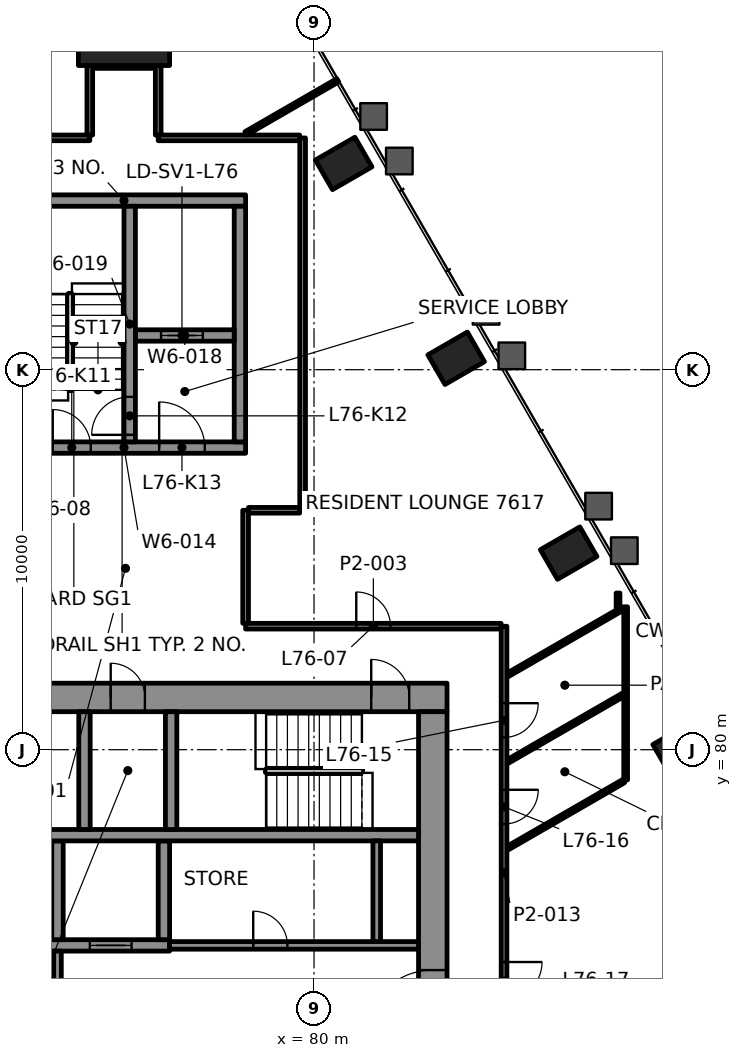
"""IFC4 building model, lengths in metres.
Left out: names, types, materials, properties, quantities, classifications, styles, units other than length and angle.
Written with IfcOpenShell. Run it as: python <this file> out.ifc"""

import sys

from ifc_helpers import new_model, si_unit, direction, frame, frame_2d, origin, origin_2d, place, context, subcontext, project, spatial, rectangle, hollow_rectangle, extrude, element, fill, save


model = new_model("IFC4")
c1 = context("Model", 3, precision=1e-05, world=origin(), true_north=direction((0.0, 1.0)))
c2 = subcontext(c1, "Body", "Model", "MODEL_VIEW")
j1 = project(units=[si_unit("LENGTHUNIT", "METRE"), si_unit("PLANEANGLEUNIT", "RADIAN")], contexts=[c1])
p1 = place(None, origin())
s1 = spatial("IfcSite", under=j1, at=p1, CompositionType="ELEMENT")
p2 = place(p1, origin())
s2 = spatial("IfcBuilding", under=s1, at=p2, CompositionType="ELEMENT")
p3 = place(p2, frame((0.0, 0.0, 312.6)))
s3 = spatial("IfcBuildingStorey", under=s2, at=p3, CompositionType="ELEMENT", Elevation=312.6)
p4 = place(p3, frame((75.0, 99.204, 0.0), z_axis=(0.0, 0.0, 1.0), x_axis=(-1.0, 0.0, 0.0)))
e1 = element("IfcColumn", 1, at=p4, inside=s3, PredefinedType="COLUMN", context=c2, shape_type="SweptSolid", body=[
    extrude(rectangle(XDim=2.4, YDim=2.4, at=origin_2d()), origin(), (0.0, 0.0, 1.0), 3.5),
])
for number, where, z_axis, x_axis in (
    (2, (89.661, 80.046, -0.0), (0.0, 0.0, 1.0), (-0.5, 0.866, 0.0)),
    (3, (86.701, 85.173, -0.0), (0.0, 0.0, 1.0), (-0.5, 0.866, 0.0)),
    (4, (83.74, 90.3, -0.0), (0.0, 0.0, 1.0), (-0.5, 0.866, 0.0)),
    (5, (80.781, 95.427, -0.0), (0.0, 0.0, 1.0), (-0.5, 0.866, 0.0)),
):
    element("IfcColumn", number, at=place(p3, frame(where, z_axis=z_axis, x_axis=x_axis)), inside=s3, PredefinedType="COLUMN", context=c2, shape_type="SweptSolid", body=[
        extrude(hollow_rectangle(XDim=0.9, YDim=1.2, WallThickness=0.06, at=origin_2d()), origin(), (0.0, 0.0, 1.0), 3.5),
    ])
p5 = place(p3, frame((66.5, 81.375, 0.0), z_axis=(0.0, 0.0, 1.0), x_axis=(1.0, 0.0, 0.0)))
e6 = element("IfcWall", 6, at=p5, inside=s3, PredefinedType="SHEAR", context=c2, shape_type="SweptSolid", body=[
    extrude(rectangle(XDim=17.0, YDim=0.75, at=frame_2d((8.5, 0.0))), origin(), (0.0, 0.0, 1.0), 3.3),
])
p6 = place(p5, frame((1.195, 0.0, 0.0)))
e7 = element("IfcOpeningElement", 7, at=p6, cuts=e6, PredefinedType="OPENING", context=c2, shape_type="SweptSolid", body=[
    extrude(rectangle(XDim=1.0, YDim=2.1, at=frame_2d((0.5, 1.05))), frame((0.0, 0.385, 0.0), z_axis=(0.0, -1.0, 0.0), x_axis=(1.0, 0.0, 0.0)), (0.0, 0.0, 1.0), 0.77),
])
p7 = place(p5, frame((15.005, 0.0, 0.0)))
e8 = element("IfcOpeningElement", 8, at=p7, cuts=e6, PredefinedType="OPENING", context=c2, shape_type="SweptSolid", body=[
    extrude(rectangle(XDim=1.0, YDim=2.1, at=frame_2d((0.5, 1.05))), frame((0.0, 0.385, 0.0), z_axis=(0.0, -1.0, 0.0), x_axis=(1.0, 0.0, 0.0)), (0.0, 0.0, 1.0), 0.77),
])
p8 = place(p5, frame((8.15, 0.0, 0.0)))
e9 = element("IfcOpeningElement", 9, at=p8, cuts=e6, PredefinedType="OPENING", context=c2, shape_type="SweptSolid", body=[
    extrude(rectangle(XDim=0.9, YDim=2.1, at=frame_2d((0.45, 1.05))), frame((0.0, 0.385, 0.0), z_axis=(0.0, -1.0, 0.0), x_axis=(1.0, 0.0, 0.0)), (0.0, 0.0, 1.0), 0.77),
])
p9 = place(p3, frame((83.125, 69.0, 0.0), z_axis=(0.0, 0.0, 1.0), x_axis=(0.0, 1.0, 0.0)))
e10 = element("IfcWall", 10, at=p9, inside=s3, PredefinedType="SHEAR", context=c2, shape_type="SweptSolid", body=[
    extrude(rectangle(XDim=12.0, YDim=0.75, at=frame_2d((6.0, 0.0))), origin(), (0.0, 0.0, 1.0), 3.3),
])
p10 = place(p9, frame((3.4, 0.0, 0.0)))
e11 = element("IfcOpeningElement", 11, at=p10, cuts=e10, PredefinedType="OPENING", context=c2, shape_type="SweptSolid", body=[
    extrude(rectangle(XDim=1.8, YDim=2.1, at=frame_2d((0.9, 1.05))), frame((0.0, 0.385, 0.0), z_axis=(0.0, -1.0, 0.0), x_axis=(1.0, 0.0, 0.0)), (0.0, 0.0, 1.0), 0.77),
])
p11 = place(p3, frame((70.3, 74.85, 0.0), z_axis=(0.0, 0.0, 1.0), x_axis=(1.0, 0.0, 0.0)))
e12 = element("IfcWall", 12, at=p11, inside=s3, PredefinedType="SHEAR", context=c2, shape_type="SweptSolid", body=[
    extrude(rectangle(XDim=5.9, YDim=0.3, at=frame_2d((2.95, 0.0))), origin(), (0.0, 0.0, 1.0), 3.3),
])
p12 = place(p11, frame((3.8, 0.0, 0.0)))
e13 = element("IfcOpeningElement", 13, at=p12, cuts=e12, PredefinedType="OPENING", context=c2, shape_type="SweptSolid", body=[
    extrude(rectangle(XDim=1.1, YDim=2.1, at=frame_2d((0.55, 1.05))), frame((0.0, 0.16, 0.0), z_axis=(0.0, -1.0, 0.0), x_axis=(1.0, 0.0, 0.0)), (0.0, 0.0, 1.0), 0.32),
])
for number, where, z_axis, x_axis in (
    (14, (73.25, 75.0, 0.0), (0.0, 0.0, 1.0), (0.0, 1.0, 0.0)),
    (15, (76.05, 75.0, 0.0), (0.0, 0.0, 1.0), (0.0, 1.0, 0.0)),
):
    element("IfcWall", number, at=place(p3, frame(where, z_axis=z_axis, x_axis=x_axis)), inside=s3, PredefinedType="SHEAR", context=c2, shape_type="SweptSolid", body=[
        extrude(rectangle(XDim=2.6, YDim=0.3, at=frame_2d((1.3, 0.0))), origin(), (0.0, 0.0, 1.0), 3.3),
    ])
p13 = place(p3, frame((67.25, 77.75, 0.0), z_axis=(0.0, 0.0, 1.0), x_axis=(1.0, 0.0, 0.0)))
e16 = element("IfcWall", 16, at=p13, inside=s3, PredefinedType="SHEAR", context=c2, shape_type="SweptSolid", body=[
    extrude(rectangle(XDim=15.5, YDim=0.3, at=frame_2d((7.75, 0.0))), origin(), (0.0, 0.0, 1.0), 3.3),
])
p14 = place(p13, frame((0.445, 0.0, 0.0)))
e17 = element("IfcOpeningElement", 17, at=p14, cuts=e16, PredefinedType="OPENING", context=c2, shape_type="SweptSolid", body=[
    extrude(rectangle(XDim=1.0, YDim=2.1, at=frame_2d((0.5, 1.05))), frame((0.0, 0.16, 0.0), z_axis=(0.0, -1.0, 0.0), x_axis=(1.0, 0.0, 0.0)), (0.0, 0.0, 1.0), 0.32),
])
for number, where, z_axis, x_axis in (
    (18, (73.96, 77.9, 0.0), (0.0, 0.0, 1.0), (0.0, 1.0, 0.0)),
    (19, (76.24, 77.9, 0.0), (0.0, 0.0, 1.0), (0.0, 1.0, 0.0)),
):
    element("IfcWall", number, at=place(p3, frame(where, z_axis=z_axis, x_axis=x_axis)), inside=s3, PredefinedType="SHEAR", context=c2, shape_type="SweptSolid", body=[
        extrude(rectangle(XDim=3.1, YDim=0.3, at=frame_2d((1.55, 0.0))), origin(), (0.0, 0.0, 1.0), 3.3),
    ])
p15 = place(p3, frame((71.8, 87.95, 0.0), z_axis=(0.0, 0.0, 1.0), x_axis=(1.0, 0.0, 0.0)))
e20 = element("IfcWall", 20, at=p15, inside=s3, PredefinedType="SHEAR", context=c2, shape_type="SweptSolid", body=[
    extrude(rectangle(XDim=6.4, YDim=0.3, at=frame_2d((3.2, 0.0))), origin(), (0.0, 0.0, 1.0), 3.3),
])
p16 = place(p15, frame((1.325, 0.0, 0.0)))
e21 = element("IfcOpeningElement", 21, at=p16, cuts=e20, PredefinedType="OPENING", context=c2, shape_type="SweptSolid", body=[
    extrude(rectangle(XDim=1.0, YDim=2.1, at=frame_2d((0.5, 1.05))), frame((0.0, 0.16, 0.0), z_axis=(0.0, -1.0, 0.0), x_axis=(1.0, 0.0, 0.0)), (0.0, 0.0, 1.0), 0.32),
])
p17 = place(p15, frame((4.125, 0.0, 0.0)))
e22 = element("IfcOpeningElement", 22, at=p17, cuts=e20, PredefinedType="OPENING", context=c2, shape_type="SweptSolid", body=[
    extrude(rectangle(XDim=1.2, YDim=2.1, at=frame_2d((0.6, 1.05))), frame((0.0, 0.16, 0.0), z_axis=(0.0, -1.0, 0.0), x_axis=(1.0, 0.0, 0.0)), (0.0, 0.0, 1.0), 0.32),
])
p18 = place(p3, frame((71.8, 94.45, 0.0), z_axis=(0.0, 0.0, 1.0), x_axis=(1.0, 0.0, 0.0)))
e23 = element("IfcWall", 23, at=p18, inside=s3, PredefinedType="SHEAR", context=c2, shape_type="SweptSolid", body=[
    extrude(rectangle(XDim=6.4, YDim=0.3, at=frame_2d((3.2, 0.0))), origin(), (0.0, 0.0, 1.0), 3.3),
])
p19 = place(p3, frame((78.05, 88.1, 0.0), z_axis=(0.0, 0.0, 1.0), x_axis=(0.0, 1.0, 0.0)))
e24 = element("IfcWall", 24, at=p19, inside=s3, PredefinedType="SHEAR", context=c2, shape_type="SweptSolid", body=[
    extrude(rectangle(XDim=6.2, YDim=0.3, at=frame_2d((3.1, 0.0))), origin(), (0.0, 0.0, 1.0), 3.3),
])
p20 = place(p3, frame((75.3, 90.9, 0.0), z_axis=(0.0, 0.0, 1.0), x_axis=(1.0, 0.0, 0.0)))
e25 = element("IfcWall", 25, at=p20, inside=s3, PredefinedType="SHEAR", context=c2, shape_type="SweptSolid", body=[
    extrude(rectangle(XDim=2.6, YDim=0.3, at=frame_2d((1.3, 0.0))), origin(), (0.0, 0.0, 1.0), 3.3),
])
p21 = place(p20, frame((0.675, 0.0, 0.0)))
e26 = element("IfcOpeningElement", 26, at=p21, cuts=e25, PredefinedType="OPENING", context=c2, shape_type="SweptSolid", body=[
    extrude(rectangle(XDim=1.1, YDim=2.1, at=frame_2d((0.55, 1.05))), frame((0.0, 0.16, 0.0), z_axis=(0.0, -1.0, 0.0), x_axis=(1.0, 0.0, 0.0)), (0.0, 0.0, 1.0), 0.32),
])
p22 = place(p3, frame((75.15, 88.1, 0.0), z_axis=(0.0, 0.0, 1.0), x_axis=(0.0, 1.0, 0.0)))
e27 = element("IfcWall", 27, at=p22, inside=s3, PredefinedType="SHEAR", context=c2, shape_type="SweptSolid", body=[
    extrude(rectangle(XDim=6.2, YDim=0.3, at=frame_2d((3.1, 0.0))), origin(), (0.0, 0.0, 1.0), 3.3),
])
p23 = place(p22, frame((0.185, 0.0, 0.0)))
e28 = element("IfcOpeningElement", 28, at=p23, cuts=e27, PredefinedType="OPENING", context=c2, shape_type="SweptSolid", body=[
    extrude(rectangle(XDim=1.0, YDim=2.1, at=frame_2d((0.5, 1.05))), frame((0.0, 0.16, 0.0), z_axis=(0.0, -1.0, 0.0), x_axis=(1.0, 0.0, 0.0)), (0.0, 0.0, 1.0), 0.32),
])
p24 = place(p3, frame((78.2, 83.25, 0.0), z_axis=(0.0, 0.0, 1.0), x_axis=(1.0, 0.0, 0.0)))
e29 = element("IfcWall", 29, at=p24, inside=s3, PredefinedType="PARTITIONING", context=c2, shape_type="SweptSolid", body=[
    extrude(rectangle(XDim=6.723, YDim=0.15, at=frame_2d((3.362, 0.0))), origin(), (0.0, 0.0, 1.0), 2.7),
])
p25 = place(p24, frame((2.911, 0.0, 0.0)))
e30 = element("IfcOpeningElement", 30, at=p25, cuts=e29, PredefinedType="OPENING", context=c2, shape_type="SweptSolid", body=[
    extrude(rectangle(XDim=0.9, YDim=2.1, at=frame_2d((0.45, 1.05))), frame((0.0, 0.085, 0.0), z_axis=(0.0, -1.0, 0.0), x_axis=(1.0, 0.0, 0.0)), (0.0, 0.0, 1.0), 0.17),
])
p26 = place(p3, frame((78.275, 86.3, 0.0), z_axis=(0.0, 0.0, 1.0), x_axis=(1.0, 0.0, 0.0)))
e31 = element("IfcWall", 31, at=p26, inside=s3, PredefinedType="PARTITIONING", context=c2, shape_type="SweptSolid", body=[
    extrude(rectangle(XDim=1.348, YDim=0.15, at=frame_2d((0.674, 0.0))), origin(), (0.0, 0.0, 1.0), 2.7),
])
p27 = place(p3, frame((70.375, 96.1, 0.0), z_axis=(0.0, 0.0, 1.0), x_axis=(1.0, 0.0, 0.0)))
e32 = element("IfcWall", 32, at=p27, inside=s3, PredefinedType="PARTITIONING", context=c2, shape_type="SweptSolid", body=[
    extrude(rectangle(XDim=3.725, YDim=0.15, at=frame_2d((1.862, 0.0))), origin(), (0.0, 0.0, 1.0), 2.7),
])
p28 = place(p3, frame((75.9, 96.1, 0.0), z_axis=(0.0, 0.0, 1.0), x_axis=(1.0, 0.0, 0.0)))
e33 = element("IfcWall", 33, at=p28, inside=s3, PredefinedType="PARTITIONING", context=c2, shape_type="SweptSolid", body=[
    extrude(rectangle(XDim=3.723, YDim=0.15, at=frame_2d((1.862, 0.0))), origin(), (0.0, 0.0, 1.0), 2.7),
])
p29 = place(p3, frame((74.176, 98.004, 0.0), z_axis=(0.0, 0.0, 1.0), x_axis=(1.0, 0.0, 0.0)))
e34 = element("IfcWall", 34, at=p29, inside=s3, PredefinedType="PARTITIONING", context=c2, shape_type="SweptSolid", body=[
    extrude(rectangle(XDim=1.649, YDim=0.15, at=frame_2d((0.824, 0.0))), origin(), (0.0, 0.0, 1.0), 2.697),
])
p30 = place(p3, frame((85.101, 77.414, 0.0), z_axis=(0.0, 0.0, 1.0), x_axis=(0.866041242935, 0.499972564782, 0.0)))
e35 = element("IfcWall", 35, at=p30, inside=s3, PredefinedType="PARTITIONING", context=c2, shape_type="SweptSolid", body=[
    extrude(rectangle(XDim=3.521, YDim=0.1, at=frame_2d((1.76, 0.0))), origin(), (0.0, 0.0, 1.0), 2.7),
])
p31 = place(p3, frame((85.101, 79.692, 0.0), z_axis=(0.0, 0.0, 1.0), x_axis=(0.866017863565, 0.500013059815, 0.0)))
e36 = element("IfcWall", 36, at=p31, inside=s3, PredefinedType="PARTITIONING", context=c2, shape_type="SweptSolid", body=[
    extrude(rectangle(XDim=3.491, YDim=0.1, at=frame_2d((1.745, 0.0))), origin(), (0.0, 0.0, 1.0), 2.7),
])
p32 = place(p3, frame((85.101, 81.971, 0.0), z_axis=(0.0, 0.0, 1.0), x_axis=(0.866017863565, 0.500013059815, 0.0)))
e37 = element("IfcWall", 37, at=p32, inside=s3, PredefinedType="PARTITIONING", context=c2, shape_type="SweptSolid", body=[
    extrude(rectangle(XDim=3.491, YDim=0.1, at=frame_2d((1.745, 0.0))), origin(), (0.0, 0.0, 1.0), 2.688),
])
p33 = place(p3, frame((78.208, 96.22, 0.0), z_axis=(0.0, 0.0, 1.0), x_axis=(0.866028321769, 0.499994945868, 0.0)))
e38 = element("IfcWall", 38, at=p33, inside=s3, PredefinedType="PARTITIONING", context=c2, shape_type="SweptSolid", body=[
    extrude(rectangle(XDim=2.792, YDim=0.1, at=frame_2d((1.396, 0.0))), origin(), (0.0, 0.0, 1.0), 2.7),
])
p34 = place(p3, frame((88.2, 79.203, 0.0), z_axis=(0.0, 0.0, 1.0), x_axis=(0.0, 1.0, 0.0)))
e39 = element("IfcWall", 39, at=p34, inside=s3, PredefinedType="PARTITIONING", context=c2, shape_type="SweptSolid", body=[
    extrude(rectangle(XDim=4.557, YDim=0.1, at=frame_2d((2.279, 0.0))), origin(), (0.0, 0.0, 1.0), 2.688),
])
p35 = place(p3, frame((88.0, 83.733, 0.0), z_axis=(0.0, 0.0, 1.0), x_axis=(0.0, 1.0, 0.0)))
e40 = element("IfcWall", 40, at=p35, inside=s3, PredefinedType="PARTITIONING", context=c2, shape_type="SweptSolid", body=[
    extrude(rectangle(XDim=0.39, YDim=0.1, at=frame_2d((0.195, 0.0))), origin(), (0.0, 0.0, 1.0), 2.7),
])
p36 = place(p3, frame((85.0, 83.248, 0.0), z_axis=(0.0, 0.0, 1.0), x_axis=(0.0, -1.0, 0.0)))
e41 = element("IfcWall", 41, at=p36, inside=s3, PredefinedType="PARTITIONING", context=c2, shape_type="SweptSolid", body=[
    extrude(rectangle(XDim=12.982, YDim=0.15, at=frame_2d((6.491, 0.0))), origin(), (0.0, 0.0, 1.0), 2.7),
])
p37 = place(p36, frame((2.024, 0.0, 0.0)))
e42 = element("IfcOpeningElement", 42, at=p37, cuts=e41, PredefinedType="OPENING", context=c2, shape_type="SweptSolid", body=[
    extrude(rectangle(XDim=0.9, YDim=2.1, at=frame_2d((0.45, 1.05))), frame((0.0, 0.085, 0.0), z_axis=(0.0, -1.0, 0.0), x_axis=(1.0, 0.0, 0.0)), (0.0, 0.0, 1.0), 0.17),
])
p38 = place(p36, frame((4.303, 0.0, 0.0)))
e43 = element("IfcOpeningElement", 43, at=p38, cuts=e41, PredefinedType="OPENING", context=c2, shape_type="SweptSolid", body=[
    extrude(rectangle(XDim=0.9, YDim=2.1, at=frame_2d((0.45, 1.05))), frame((0.0, 0.085, 0.0), z_axis=(0.0, -1.0, 0.0), x_axis=(1.0, 0.0, 0.0)), (0.0, 0.0, 1.0), 0.17),
])
p39 = place(p36, frame((8.836, 0.0, 0.0)))
e44 = element("IfcOpeningElement", 44, at=p39, cuts=e41, PredefinedType="OPENING", context=c2, shape_type="SweptSolid", body=[
    extrude(rectangle(XDim=1.0, YDim=2.1, at=frame_2d((0.5, 1.05))), frame((0.0, 0.085, 0.0), z_axis=(0.0, -1.0, 0.0), x_axis=(1.0, 0.0, 0.0)), (0.0, 0.0, 1.0), 0.17),
])
p40 = place(p3, frame((79.7, 86.302, 0.0), z_axis=(0.0, 0.0, 1.0), x_axis=(0.0, 1.0, 0.0)))
e45 = element("IfcWall", 45, at=p40, inside=s3, PredefinedType="PARTITIONING", context=c2, shape_type="SweptSolid", body=[
    extrude(rectangle(XDim=9.796, YDim=0.15, at=frame_2d((4.898, 0.0))), origin(), (0.0, 0.0, 1.0), 2.7),
])
p41 = place(p3, frame((78.2, 83.325, 0.0), z_axis=(0.0, 0.0, 1.0), x_axis=(0.0, 1.0, 0.0)))
e46 = element("IfcWall", 46, at=p41, inside=s3, PredefinedType="PARTITIONING", context=c2, shape_type="SweptSolid", body=[
    extrude(rectangle(XDim=2.975, YDim=0.15, at=frame_2d((1.488, 0.0))), origin(), (0.0, 0.0, 1.0), 2.7),
])
for number, where, z_axis, x_axis in (
    (47, (75.9, 96.175, 0.0), (0.0, 0.0, 1.0), (0.0, 1.0, 0.0)),
    (48, (74.1, 96.175, 0.0), (0.0, 0.0, 1.0), (0.0, 1.0, 0.0)),
):
    element("IfcWall", number, at=place(p3, frame(where, z_axis=z_axis, x_axis=x_axis)), inside=s3, PredefinedType="PARTITIONING", context=c2, shape_type="SweptSolid", body=[
        extrude(rectangle(XDim=1.828, YDim=0.15, at=frame_2d((0.914, 0.0))), origin(), (0.0, 0.0, 1.0), 2.7),
    ])
p42 = place(p3, frame((76.2, 74.85, 0.0), z_axis=(0.0, 0.0, 1.0), x_axis=(1.0, 0.0, 0.0)))
e49 = element("IfcWall", 49, at=p42, inside=s3, PredefinedType="PARTITIONING", context=c2, shape_type="SweptSolid", body=[
    extrude(rectangle(XDim=6.55, YDim=0.2, at=frame_2d((3.275, 0.0))), origin(), (0.0, 0.0, 1.0), 3.3),
])
p43 = place(p42, frame((2.2, 0.0, 0.0)))
e50 = element("IfcOpeningElement", 50, at=p43, cuts=e49, PredefinedType="OPENING", context=c2, shape_type="SweptSolid", body=[
    extrude(rectangle(XDim=0.9, YDim=2.1, at=frame_2d((0.45, 1.05))), frame((0.0, 0.11, 0.0), z_axis=(0.0, -1.0, 0.0), x_axis=(1.0, 0.0, 0.0)), (0.0, 0.0, 1.0), 0.22),
])
p44 = place(p3, frame((73.25, 71.9, 0.0), z_axis=(0.0, 0.0, 1.0), x_axis=(0.0, 1.0, 0.0)))
e51 = element("IfcWall", 51, at=p44, inside=s3, PredefinedType="PARTITIONING", context=c2, shape_type="SweptSolid", body=[
    extrude(rectangle(XDim=2.8, YDim=0.2, at=frame_2d((1.4, 0.0))), origin(), (0.0, 0.0, 1.0), 3.3),
])
p45 = place(p44, frame((0.8, 0.0, 0.0)))
e52 = element("IfcOpeningElement", 52, at=p45, cuts=e51, PredefinedType="OPENING", context=c2, shape_type="SweptSolid", body=[
    extrude(rectangle(XDim=1.2, YDim=2.1, at=frame_2d((0.6, 1.05))), frame((0.0, 0.11, 0.0), z_axis=(0.0, -1.0, 0.0), x_axis=(1.0, 0.0, 0.0)), (0.0, 0.0, 1.0), 0.22),
])
p46 = place(p3, frame((81.65, 74.95, 0.0), z_axis=(0.0, 0.0, 1.0), x_axis=(0.0, 1.0, 0.0)))
e53 = element("IfcWall", 53, at=p46, inside=s3, PredefinedType="PARTITIONING", context=c2, shape_type="SweptSolid", body=[
    extrude(rectangle(XDim=2.65, YDim=0.2, at=frame_2d((1.325, 0.0))), origin(), (0.0, 0.0, 1.0), 3.3),
])
p47 = place(p25, origin())
e54 = element("IfcDoor", 54, at=p47, inside=s3, OperationType="SINGLE_SWING_RIGHT", PredefinedType="DOOR", context=c2, shape_type="SweptSolid", body=[
    extrude(rectangle(XDim=0.9, YDim=2.1, at=frame_2d((0.45, 1.05))), frame((0.0, 0.025, 0.0), z_axis=(0.0, -1.0, 0.0), x_axis=(1.0, 0.0, 0.0)), (0.0, 0.0, 1.0), 0.05),
])
fill(e30, e54)
p48 = place(p37, origin())
e55 = element("IfcDoor", 55, at=p48, inside=s3, OperationType="SINGLE_SWING_RIGHT", PredefinedType="DOOR", context=c2, shape_type="SweptSolid", body=[
    extrude(rectangle(XDim=0.9, YDim=2.1, at=frame_2d((0.45, 1.05))), frame((0.0, 0.025, 0.0), z_axis=(0.0, -1.0, 0.0), x_axis=(1.0, 0.0, 0.0)), (0.0, 0.0, 1.0), 0.05),
])
fill(e42, e55)
p49 = place(p38, origin())
e56 = element("IfcDoor", 56, at=p49, inside=s3, OperationType="SINGLE_SWING_LEFT", PredefinedType="DOOR", context=c2, shape_type="SweptSolid", body=[
    extrude(rectangle(XDim=0.9, YDim=2.1, at=frame_2d((0.45, 1.05))), frame((0.0, 0.025, 0.0), z_axis=(0.0, -1.0, 0.0), x_axis=(1.0, 0.0, 0.0)), (0.0, 0.0, 1.0), 0.05),
])
fill(e43, e56)
p50 = place(p39, origin())
e57 = element("IfcDoor", 57, at=p50, inside=s3, OperationType="SINGLE_SWING_RIGHT", PredefinedType="DOOR", context=c2, shape_type="SweptSolid", body=[
    extrude(rectangle(XDim=1.0, YDim=2.1, at=frame_2d((0.5, 1.05))), frame((0.0, 0.025, 0.0), z_axis=(0.0, -1.0, 0.0), x_axis=(1.0, 0.0, 0.0)), (0.0, 0.0, 1.0), 0.05),
])
fill(e44, e57)
p51 = place(p12, origin())
e58 = element("IfcDoor", 58, at=p51, inside=s3, OperationType="DOUBLE_DOOR_SLIDING", PredefinedType="DOOR", context=c2, shape_type="SweptSolid", body=[
    extrude(rectangle(XDim=1.1, YDim=2.1, at=frame_2d((0.55, 1.05))), frame((0.0, 0.025, 0.0), z_axis=(0.0, -1.0, 0.0), x_axis=(1.0, 0.0, 0.0)), (0.0, 0.0, 1.0), 0.05),
])
fill(e13, e58)
p52 = place(p21, origin())
e59 = element("IfcDoor", 59, at=p52, inside=s3, OperationType="DOUBLE_DOOR_SLIDING", PredefinedType="DOOR", context=c2, shape_type="SweptSolid", body=[
    extrude(rectangle(XDim=1.1, YDim=2.1, at=frame_2d((0.55, 1.05))), frame((0.0, 0.025, 0.0), z_axis=(0.0, -1.0, 0.0), x_axis=(1.0, 0.0, 0.0)), (0.0, 0.0, 1.0), 0.05),
])
fill(e26, e59)
p53 = place(p7, origin())
e60 = element("IfcDoor", 60, at=p53, inside=s3, OperationType="SINGLE_SWING_LEFT", PredefinedType="DOOR", context=c2, shape_type="SweptSolid", body=[
    extrude(rectangle(XDim=1.0, YDim=2.1, at=frame_2d((0.5, 1.05))), frame((0.0, 0.095, 0.0), z_axis=(0.0, -1.0, 0.0), x_axis=(1.0, 0.0, 0.0)), (0.0, 0.0, 1.0), 0.19),
])
fill(e8, e60)
p54 = place(p16, origin())
e61 = element("IfcDoor", 61, at=p54, inside=s3, OperationType="SINGLE_SWING_RIGHT", PredefinedType="DOOR", context=c2, shape_type="SweptSolid", body=[
    extrude(rectangle(XDim=1.0, YDim=2.1, at=frame_2d((0.5, 1.05))), frame((0.0, 0.025, 0.0), z_axis=(0.0, -1.0, 0.0), x_axis=(1.0, 0.0, 0.0)), (0.0, 0.0, 1.0), 0.05),
])
fill(e21, e61)
p55 = place(p23, origin())
e62 = element("IfcDoor", 62, at=p55, inside=s3, OperationType="SINGLE_SWING_LEFT", PredefinedType="DOOR", context=c2, shape_type="SweptSolid", body=[
    extrude(rectangle(XDim=1.0, YDim=2.1, at=frame_2d((0.5, 1.05))), frame((0.0, 0.025, 0.0), z_axis=(0.0, -1.0, 0.0), x_axis=(1.0, 0.0, 0.0)), (0.0, 0.0, 1.0), 0.05),
])
fill(e28, e62)
p56 = place(p17, origin())
e63 = element("IfcDoor", 63, at=p56, inside=s3, OperationType="SINGLE_SWING_RIGHT", PredefinedType="DOOR", context=c2, shape_type="SweptSolid", body=[
    extrude(rectangle(XDim=1.2, YDim=2.1, at=frame_2d((0.6, 1.05))), frame((0.0, 0.025, 0.0), z_axis=(0.0, -1.0, 0.0), x_axis=(1.0, 0.0, 0.0)), (0.0, 0.0, 1.0), 0.05),
])
fill(e22, e63)
p57 = place(p10, origin())
e64 = element("IfcDoor", 64, at=p57, inside=s3, OperationType="SINGLE_SWING_LEFT", PredefinedType="DOOR", context=c2, shape_type="SweptSolid", body=[
    extrude(rectangle(XDim=1.8, YDim=2.1, at=frame_2d((0.9, 1.05))), frame((0.0, 0.095, 0.0), z_axis=(0.0, -1.0, 0.0), x_axis=(1.0, 0.0, 0.0)), (0.0, 0.0, 1.0), 0.19),
])
fill(e11, e64)
p58 = place(p43, origin())
e65 = element("IfcDoor", 65, at=p58, inside=s3, OperationType="SINGLE_SWING_LEFT", PredefinedType="DOOR", context=c2, shape_type="SweptSolid", body=[
    extrude(rectangle(XDim=0.9, YDim=2.1, at=frame_2d((0.45, 1.05))), frame((0.0, 0.025, 0.0), z_axis=(0.0, -1.0, 0.0), x_axis=(1.0, 0.0, 0.0)), (0.0, 0.0, 1.0), 0.05),
])
fill(e50, e65)
p59 = place(p8, origin())
e66 = element("IfcDoor", 66, at=p59, inside=s3, OperationType="SINGLE_SWING_RIGHT", PredefinedType="DOOR", context=c2, shape_type="SweptSolid", body=[
    extrude(rectangle(XDim=0.9, YDim=2.1, at=frame_2d((0.45, 1.05))), frame((0.0, 0.095, 0.0), z_axis=(0.0, -1.0, 0.0), x_axis=(1.0, 0.0, 0.0)), (0.0, 0.0, 1.0), 0.19),
])
fill(e9, e66)
save(model, sys.argv[1])
